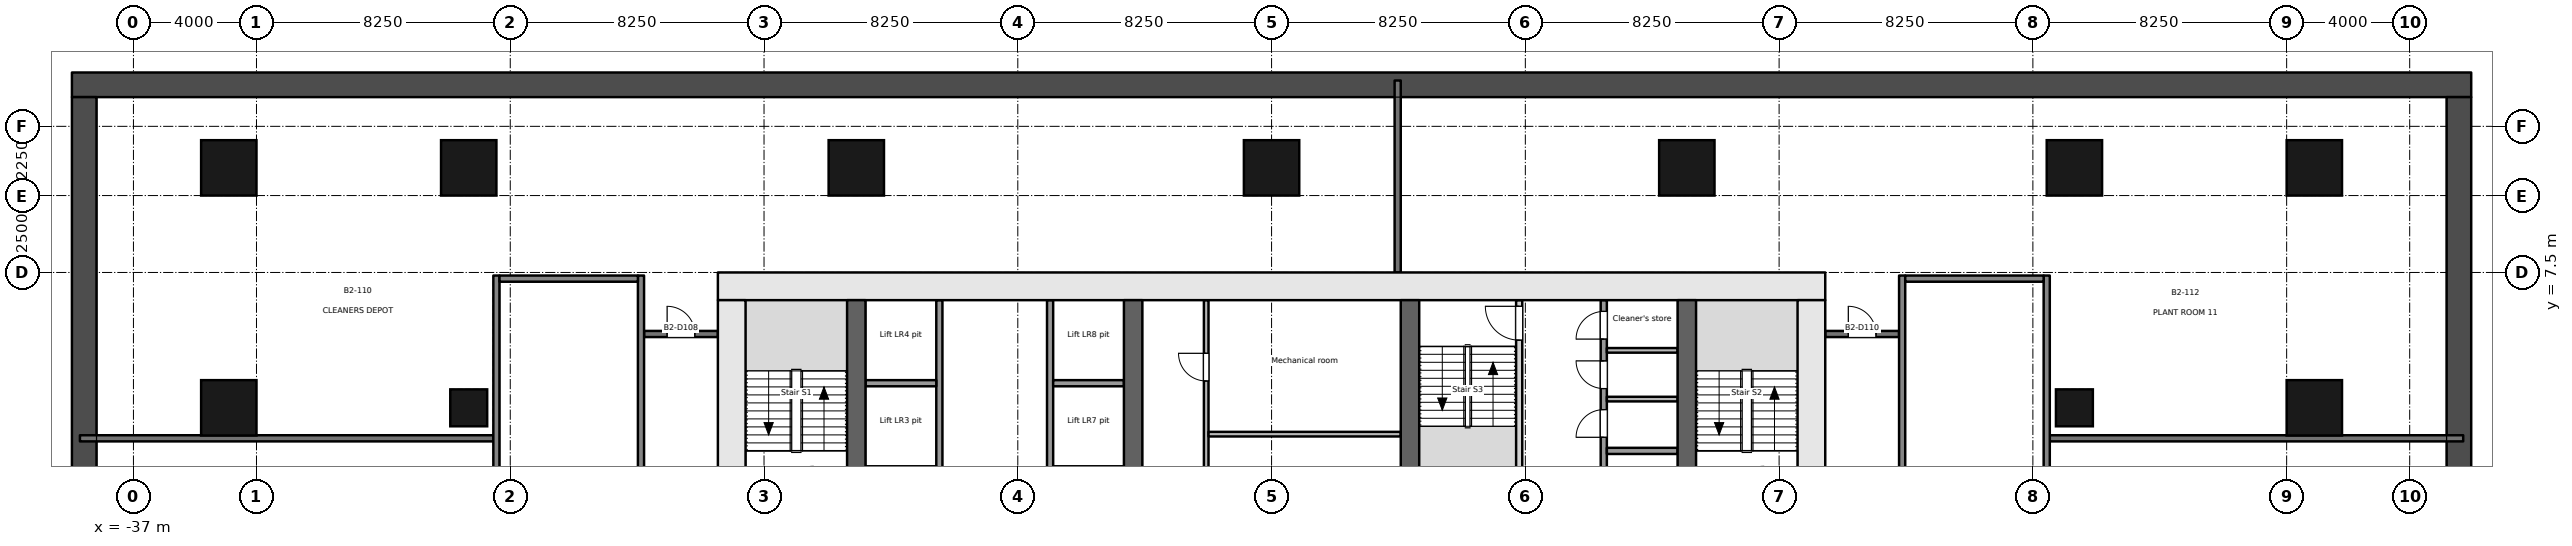
"""IFC4 building model, lengths in metres.
Left out: names, types, materials, properties, quantities, classifications, styles, units other than length and angle.
Written with IfcOpenShell. Run it as: python <this file> out.ifc"""

import sys

from ifc_helpers import new_model, si_unit, direction, frame, frame_2d, origin, origin_2d, place, context, subcontext, project, spatial, rectangle, extrude, element, fill, save


model = new_model("IFC4")
c1 = context("Model", 3, precision=1e-05, world=origin(), true_north=direction((0.0, 1.0)))
c2 = subcontext(c1, "Body", "Model", "MODEL_VIEW")
j1 = project(units=[si_unit("LENGTHUNIT", "METRE"), si_unit("PLANEANGLEUNIT", "RADIAN")], contexts=[c1])
p1 = place(None, origin())
s1 = spatial("IfcSite", under=j1, at=p1, CompositionType="ELEMENT")
p2 = place(p1, origin())
s2 = spatial("IfcBuilding", under=s1, at=p2, CompositionType="ELEMENT")
p3 = place(p2, frame((0.0, 0.0, -9.5)))
s3 = spatial("IfcBuildingStorey", under=s2, at=p3, CompositionType="ELEMENT", Elevation=-9.5)
p4 = place(p3, frame((-39.0, 13.6, -0.2), z_axis=(0.0, 0.0, 1.0), x_axis=(1.0, 0.0, 0.0)))
e1 = element("IfcWall", 1, at=p4, inside=s3, PredefinedType="SOLIDWALL", context=c2, shape_type="SweptSolid", body=[
    extrude(rectangle(XDim=78.0, YDim=0.8, at=frame_2d((39.0, 0.0))), origin(), (0.0, 0.0, 1.0), 4.0),
])
for number, where, z_axis, x_axis in (
    (2, (-38.6, -38.7, -0.2), (0.0, 0.0, 1.0), (0.0, 1.0, 0.0)),
    (3, (38.6, -38.7, -0.2), (0.0, 0.0, 1.0), (0.0, 1.0, 0.0)),
):
    element("IfcWall", number, at=place(p3, frame(where, z_axis=z_axis, x_axis=x_axis)), inside=s3, PredefinedType="SOLIDWALL", context=c2, shape_type="SweptSolid", body=[
        extrude(rectangle(XDim=51.9, YDim=0.8, at=frame_2d((25.95, 0.0))), origin(), (0.0, 0.0, 1.0), 4.0),
    ])
for number, where, z_axis, x_axis in (
    (4, (-33.9, 10.9, -0.2), (0.0, 0.0, 1.0), (1.0, 0.0, 0.0)),
    (5, (33.9, 10.9, -0.2), (0.0, 0.0, 1.0), (1.0, 0.0, 0.0)),
    (6, (-33.9, 3.1, -0.2), (0.0, 0.0, 1.0), (0.0, 1.0, 0.0)),
    (7, (33.9, 3.1, -0.2), (0.0, 0.0, 1.0), (0.0, 1.0, 0.0)),
    (8, (-26.1, 10.9, -0.2), (0.0, 0.0, 1.0), (1.0, 0.0, 0.0)),
    (9, (-13.5, 10.9, -0.2), (0.0, 0.0, 1.0), (1.0, 0.0, 0.0)),
    (10, (0.0, 10.9, -0.2), (0.0, 0.0, 1.0), (1.0, 0.0, 0.0)),
    (11, (13.5, 10.9, -0.2), (0.0, 0.0, 1.0), (1.0, 0.0, 0.0)),
    (12, (26.1, 10.9, -0.2), (0.0, 0.0, 1.0), (1.0, 0.0, 0.0)),
):
    element("IfcColumn", number, at=place(p3, frame(where, z_axis=z_axis, x_axis=x_axis)), inside=s3, PredefinedType="COLUMN", context=c2, shape_type="SweptSolid", body=[
        extrude(rectangle(XDim=1.8, YDim=1.8, at=origin_2d()), origin(), (0.0, 0.0, 1.0), 4.0),
    ])
for number, where, z_axis, x_axis in (
    (13, (-26.1, 3.1, -0.2), (0.0, 0.0, 1.0), (1.0, 0.0, 0.0)),
    (14, (26.1, 3.1, -0.2), (0.0, 0.0, 1.0), (1.0, 0.0, 0.0)),
):
    element("IfcColumn", number, at=place(p3, frame(where, z_axis=z_axis, x_axis=x_axis)), inside=s3, PredefinedType="COLUMN", context=c2, shape_type="SweptSolid", body=[
        extrude(rectangle(XDim=1.2, YDim=1.2, at=origin_2d()), origin(), (0.0, 0.0, 1.0), 4.0),
    ])
p5 = place(p3, frame((-18.0, 7.05, -0.2), z_axis=(0.0, 0.0, 1.0), x_axis=(1.0, 0.0, 0.0)))
e15 = element("IfcWall", 15, at=p5, inside=s3, PredefinedType="SHEAR", context=c2, shape_type="SweptSolid", body=[
    extrude(rectangle(XDim=36.0, YDim=0.9, at=frame_2d((18.0, 0.0))), origin(), (0.0, 0.0, 1.0), 4.0),
])
p6 = place(p3, frame((-17.55, -6.6, -0.2), z_axis=(0.0, 0.0, 1.0), x_axis=(0.0, 1.0, 0.0)))
e16 = element("IfcWall", 16, at=p6, inside=s3, PredefinedType="SHEAR", context=c2, shape_type="SweptSolid", body=[
    extrude(rectangle(XDim=13.2, YDim=0.9, at=frame_2d((6.6, 0.0))), origin(), (0.0, 0.0, 1.0), 4.0),
])
p7 = place(p6, frame((4.55, 0.0, 0.2)))
e17 = element("IfcOpeningElement", 17, at=p7, cuts=e16, PredefinedType="OPENING", context=c2, shape_type="SweptSolid", body=[
    extrude(rectangle(XDim=1.2, YDim=2.1, at=frame_2d((0.6, 1.05))), frame((0.0, 0.46, 0.0), z_axis=(0.0, -1.0, 0.0), x_axis=(1.0, 0.0, 0.0)), (0.0, 0.0, 1.0), 0.921),
])
p8 = place(p3, frame((17.55, -6.6, -0.2), z_axis=(0.0, 0.0, 1.0), x_axis=(0.0, 1.0, 0.0)))
e18 = element("IfcWall", 18, at=p8, inside=s3, PredefinedType="SHEAR", context=c2, shape_type="SweptSolid", body=[
    extrude(rectangle(XDim=13.2, YDim=0.9, at=frame_2d((6.6, 0.0))), origin(), (0.0, 0.0, 1.0), 4.0),
])
p9 = place(p8, frame((4.55, 0.0, 0.2)))
e19 = element("IfcOpeningElement", 19, at=p9, cuts=e18, PredefinedType="OPENING", context=c2, shape_type="SweptSolid", body=[
    extrude(rectangle(XDim=1.2, YDim=2.1, at=frame_2d((0.6, 1.05))), frame((0.0, 0.46, 0.0), z_axis=(0.0, -1.0, 0.0), x_axis=(1.0, 0.0, 0.0)), (0.0, 0.0, 1.0), 0.921),
])
for number, where, z_axis, x_axis in (
    (20, (-13.5, -6.6, -0.2), (0.0, 0.0, 1.0), (0.0, 1.0, 0.0)),
    (21, (-4.5, -6.6, -0.2), (0.0, 0.0, 1.0), (0.0, 1.0, 0.0)),
    (22, (4.5, -6.6, -0.2), (0.0, 0.0, 1.0), (0.0, 1.0, 0.0)),
    (23, (13.5, -6.6, -0.2), (0.0, 0.0, 1.0), (0.0, 1.0, 0.0)),
):
    element("IfcWall", number, at=place(p3, frame(where, z_axis=z_axis, x_axis=x_axis)), inside=s3, PredefinedType="SHEAR", context=c2, shape_type="SweptSolid", body=[
        extrude(rectangle(XDim=13.2, YDim=0.6, at=frame_2d((6.6, 0.0))), origin(), (0.0, 0.0, 1.0), 4.0),
    ])
p10 = place(p3, frame((-10.8, -6.6, 0.0), z_axis=(0.0, 0.0, 1.0), x_axis=(0.0, 1.0, 0.0)))
e24 = element("IfcWall", 24, at=p10, inside=s3, PredefinedType="PARTITIONING", context=c2, shape_type="SweptSolid", body=[
    extrude(rectangle(XDim=13.2, YDim=0.2, at=frame_2d((6.6, 0.0))), origin(), (0.0, 0.0, 1.0), 3.8),
])
p11 = place(p10, frame((0.55, 0.0, 0.0)))
e25 = element("IfcOpeningElement", 25, at=p11, cuts=e24, PredefinedType="OPENING", context=c2, shape_type="SweptSolid", body=[
    extrude(rectangle(XDim=0.9, YDim=2.1, at=frame_2d((0.45, 1.05))), frame((0.0, 0.111, 0.0), z_axis=(0.0, -1.0, 0.0), x_axis=(1.0, 0.0, 0.0)), (0.0, 0.0, 1.0), 0.221),
])
p12 = place(p3, frame((-7.2, -6.6, 0.0), z_axis=(0.0, 0.0, 1.0), x_axis=(0.0, 1.0, 0.0)))
e26 = element("IfcWall", 26, at=p12, inside=s3, PredefinedType="PARTITIONING", context=c2, shape_type="SweptSolid", body=[
    extrude(rectangle(XDim=13.2, YDim=0.2, at=frame_2d((6.6, 0.0))), origin(), (0.0, 0.0, 1.0), 3.8),
])
p13 = place(p12, frame((0.55, 0.0, 0.0)))
e27 = element("IfcOpeningElement", 27, at=p13, cuts=e26, PredefinedType="OPENING", context=c2, shape_type="SweptSolid", body=[
    extrude(rectangle(XDim=0.9, YDim=2.1, at=frame_2d((0.45, 1.05))), frame((0.0, 0.111, 0.0), z_axis=(0.0, -1.0, 0.0), x_axis=(1.0, 0.0, 0.0)), (0.0, 0.0, 1.0), 0.221),
])
for number, where, z_axis, x_axis in (
    (28, (-13.2, 3.9, 0.0), (0.0, 0.0, 1.0), (1.0, 0.0, 0.0)),
    (29, (-7.1, 3.9, 0.0), (0.0, 0.0, 1.0), (1.0, 0.0, 0.0)),
):
    element("IfcWall", number, at=place(p3, frame(where, z_axis=z_axis, x_axis=x_axis)), inside=s3, PredefinedType="PARTITIONING", context=c2, shape_type="SweptSolid", body=[
        extrude(rectangle(XDim=2.3, YDim=0.2, at=frame_2d((1.15, 0.0))), origin(), (0.0, 0.0, 1.0), 3.8),
    ])
p14 = place(p3, frame((-2.125, -6.6, 0.0), z_axis=(0.0, 0.0, 1.0), x_axis=(0.0, 1.0, 0.0)))
e30 = element("IfcWall", 30, at=p14, inside=s3, PredefinedType="PARTITIONING", context=c2, shape_type="SweptSolid", body=[
    extrude(rectangle(XDim=13.2, YDim=0.15, at=frame_2d((6.6, 0.0))), origin(), (0.0, 0.0, 1.0), 3.8),
])
p15 = place(p14, frame((1.794, 0.0, 0.0)))
e31 = element("IfcOpeningElement", 31, at=p15, cuts=e30, PredefinedType="OPENING", context=c2, shape_type="SweptSolid", body=[
    extrude(rectangle(XDim=0.9, YDim=2.1, at=frame_2d((0.45, 1.05))), frame((0.0, 0.085, 0.0), z_axis=(0.0, -1.0, 0.0), x_axis=(1.0, 0.0, 0.0)), (0.0, 0.0, 1.0), 0.171),
])
p16 = place(p14, frame((6.216, 0.0, 0.0)))
e32 = element("IfcOpeningElement", 32, at=p16, cuts=e30, PredefinedType="OPENING", context=c2, shape_type="SweptSolid", body=[
    extrude(rectangle(XDim=0.9, YDim=2.1, at=frame_2d((0.45, 1.05))), frame((0.0, 0.085, 0.0), z_axis=(0.0, -1.0, 0.0), x_axis=(1.0, 0.0, 0.0)), (0.0, 0.0, 1.0), 0.171),
])
p17 = place(p14, frame((10.572, 0.0, 0.0)))
e33 = element("IfcOpeningElement", 33, at=p17, cuts=e30, PredefinedType="OPENING", context=c2, shape_type="SweptSolid", body=[
    extrude(rectangle(XDim=0.9, YDim=2.1, at=frame_2d((0.45, 1.05))), frame((0.0, 0.085, 0.0), z_axis=(0.0, -1.0, 0.0), x_axis=(1.0, 0.0, 0.0)), (0.0, 0.0, 1.0), 0.171),
])
p18 = place(p3, frame((-2.05, 2.244, 0.0), z_axis=(0.0, 0.0, 1.0), x_axis=(1.0, 0.0, 0.0)))
e34 = element("IfcWall", 34, at=p18, inside=s3, PredefinedType="PARTITIONING", context=c2, shape_type="SweptSolid", body=[
    extrude(rectangle(XDim=6.25, YDim=0.15, at=frame_2d((3.125, 0.0))), origin(), (0.0, 0.0, 1.0), 3.8),
])
p19 = place(p3, frame((8.05, -6.6, 0.0), z_axis=(0.0, 0.0, 1.0), x_axis=(0.0, 1.0, 0.0)))
e35 = element("IfcWall", 35, at=p19, inside=s3, PredefinedType="PARTITIONING", context=c2, shape_type="SweptSolid", body=[
    extrude(rectangle(XDim=13.2, YDim=0.2, at=frame_2d((6.6, 0.0))), origin(), (0.0, 0.0, 1.0), 3.8),
])
p20 = place(p19, frame((1.386, 0.0, 0.0)))
e36 = element("IfcOpeningElement", 36, at=p20, cuts=e35, PredefinedType="OPENING", context=c2, shape_type="SweptSolid", body=[
    extrude(rectangle(XDim=0.9, YDim=2.1, at=frame_2d((0.45, 1.05))), frame((0.0, 0.111, 0.0), z_axis=(0.0, -1.0, 0.0), x_axis=(1.0, 0.0, 0.0)), (0.0, 0.0, 1.0), 0.221),
])
p21 = place(p19, frame((4.786, 0.0, 0.0)))
e37 = element("IfcOpeningElement", 37, at=p21, cuts=e35, PredefinedType="OPENING", context=c2, shape_type="SweptSolid", body=[
    extrude(rectangle(XDim=0.9, YDim=2.1, at=frame_2d((0.45, 1.05))), frame((0.0, 0.111, 0.0), z_axis=(0.0, -1.0, 0.0), x_axis=(1.0, 0.0, 0.0)), (0.0, 0.0, 1.0), 0.221),
])
p22 = place(p19, frame((11.9, 0.0, 0.0)))
e38 = element("IfcOpeningElement", 38, at=p22, cuts=e35, PredefinedType="OPENING", context=c2, shape_type="SweptSolid", body=[
    extrude(rectangle(XDim=1.1, YDim=2.1, at=frame_2d((0.55, 1.05))), frame((0.0, 0.111, 0.0), z_axis=(0.0, -1.0, 0.0), x_axis=(1.0, 0.0, 0.0)), (0.0, 0.0, 1.0), 0.221),
])
p23 = place(p3, frame((10.8, -6.6, 0.0), z_axis=(0.0, 0.0, 1.0), x_axis=(0.0, 1.0, 0.0)))
e39 = element("IfcWall", 39, at=p23, inside=s3, PredefinedType="PARTITIONING", context=c2, shape_type="SweptSolid", body=[
    extrude(rectangle(XDim=13.2, YDim=0.2, at=frame_2d((6.6, 0.0))), origin(), (0.0, 0.0, 1.0), 3.8),
])
p24 = place(p23, frame((0.7, 0.0, 0.0)))
e40 = element("IfcOpeningElement", 40, at=p24, cuts=e39, PredefinedType="OPENING", context=c2, shape_type="SweptSolid", body=[
    extrude(rectangle(XDim=1.2, YDim=2.1, at=frame_2d((0.6, 1.05))), frame((0.0, 0.111, 0.0), z_axis=(0.0, -1.0, 0.0), x_axis=(1.0, 0.0, 0.0)), (0.0, 0.0, 1.0), 0.221),
])
p25 = place(p23, frame((3.6, 0.0, 0.0)))
e41 = element("IfcOpeningElement", 41, at=p25, cuts=e39, PredefinedType="OPENING", context=c2, shape_type="SweptSolid", body=[
    extrude(rectangle(XDim=1.0, YDim=2.1, at=frame_2d((0.5, 1.05))), frame((0.0, 0.111, 0.0), z_axis=(0.0, -1.0, 0.0), x_axis=(1.0, 0.0, 0.0)), (0.0, 0.0, 1.0), 0.221),
])
p26 = place(p23, frame((6.4, 0.0, 0.0)))
e42 = element("IfcOpeningElement", 42, at=p26, cuts=e39, PredefinedType="OPENING", context=c2, shape_type="SweptSolid", body=[
    extrude(rectangle(XDim=1.0, YDim=2.1, at=frame_2d((0.5, 1.05))), frame((0.0, 0.111, 0.0), z_axis=(0.0, -1.0, 0.0), x_axis=(1.0, 0.0, 0.0)), (0.0, 0.0, 1.0), 0.221),
])
p27 = place(p23, frame((8.742, 0.0, 0.0)))
e43 = element("IfcOpeningElement", 43, at=p27, cuts=e39, PredefinedType="OPENING", context=c2, shape_type="SweptSolid", body=[
    extrude(rectangle(XDim=0.9, YDim=2.1, at=frame_2d((0.45, 1.05))), frame((0.0, 0.111, 0.0), z_axis=(0.0, -1.0, 0.0), x_axis=(1.0, 0.0, 0.0)), (0.0, 0.0, 1.0), 0.221),
])
p28 = place(p23, frame((10.326, 0.0, 0.0)))
e44 = element("IfcOpeningElement", 44, at=p28, cuts=e39, PredefinedType="OPENING", context=c2, shape_type="SweptSolid", body=[
    extrude(rectangle(XDim=0.9, YDim=2.1, at=frame_2d((0.45, 1.05))), frame((0.0, 0.111, 0.0), z_axis=(0.0, -1.0, 0.0), x_axis=(1.0, 0.0, 0.0)), (0.0, 0.0, 1.0), 0.221),
])
p29 = place(p23, frame((11.934, 0.0, 0.0)))
e45 = element("IfcOpeningElement", 45, at=p29, cuts=e39, PredefinedType="OPENING", context=c2, shape_type="SweptSolid", body=[
    extrude(rectangle(XDim=0.9, YDim=2.1, at=frame_2d((0.45, 1.05))), frame((0.0, 0.111, 0.0), z_axis=(0.0, -1.0, 0.0), x_axis=(1.0, 0.0, 0.0)), (0.0, 0.0, 1.0), 0.221),
])
p30 = place(p3, frame((10.9, 1.7, 0.0), z_axis=(0.0, 0.0, 1.0), x_axis=(1.0, 0.0, 0.0)))
e46 = element("IfcWall", 46, at=p30, inside=s3, PredefinedType="PARTITIONING", context=c2, shape_type="SweptSolid", body=[
    extrude(rectangle(XDim=2.3, YDim=0.2, at=frame_2d((1.15, 0.0))), origin(), (0.0, 0.0, 1.0), 3.8),
])
for number, where, z_axis, x_axis in (
    (47, (10.9, 3.384, 0.0), (0.0, 0.0, 1.0), (1.0, 0.0, 0.0)),
    (48, (10.9, 4.968, 0.0), (0.0, 0.0, 1.0), (1.0, 0.0, 0.0)),
):
    element("IfcWall", number, at=place(p3, frame(where, z_axis=z_axis, x_axis=x_axis)), inside=s3, PredefinedType="PARTITIONING", context=c2, shape_type="SweptSolid", body=[
        extrude(rectangle(XDim=2.3, YDim=0.15, at=frame_2d((1.15, 0.0))), origin(), (0.0, 0.0, 1.0), 3.8),
    ])
for number, where, z_axis, x_axis in (
    (49, (-20.5, 7.4, -0.2), (0.0, 0.0, 1.0), (0.0, -1.0, 0.0)),
    (50, (-25.2, 0.0, -0.2), (0.0, 0.0, 1.0), (0.0, 1.0, 0.0)),
):
    element("IfcWall", number, at=place(p3, frame(where, z_axis=z_axis, x_axis=x_axis)), inside=s3, PredefinedType="SHEAR", context=c2, shape_type="SweptSolid", body=[
        extrude(rectangle(XDim=7.4, YDim=0.2, at=frame_2d((3.7, 0.0))), origin(), (0.0, 0.0, 1.0), 4.0),
    ])
p31 = place(p3, frame((-25.1, 7.3, -0.2), z_axis=(0.0, 0.0, 1.0), x_axis=(1.0, 0.0, 0.0)))
e51 = element("IfcWall", 51, at=p31, inside=s3, PredefinedType="SHEAR", context=c2, shape_type="SweptSolid", body=[
    extrude(rectangle(XDim=4.5, YDim=0.2, at=frame_2d((2.25, 0.0))), origin(), (0.0, 0.0, 1.0), 4.0),
])
for number, where, z_axis, x_axis in (
    (52, (20.5, 0.0, -0.2), (0.0, 0.0, 1.0), (0.0, 1.0, 0.0)),
    (53, (25.2, 0.0, -0.2), (0.0, 0.0, 1.0), (0.0, 1.0, 0.0)),
):
    element("IfcWall", number, at=place(p3, frame(where, z_axis=z_axis, x_axis=x_axis)), inside=s3, PredefinedType="SHEAR", context=c2, shape_type="SweptSolid", body=[
        extrude(rectangle(XDim=7.4, YDim=0.2, at=frame_2d((3.7, 0.0))), origin(), (0.0, 0.0, 1.0), 4.0),
    ])
p32 = place(p3, frame((20.6, 7.3, -0.2), z_axis=(0.0, 0.0, 1.0), x_axis=(1.0, 0.0, 0.0)))
e54 = element("IfcWall", 54, at=p32, inside=s3, PredefinedType="SHEAR", context=c2, shape_type="SweptSolid", body=[
    extrude(rectangle(XDim=4.5, YDim=0.2, at=frame_2d((2.25, 0.0))), origin(), (0.0, 0.0, 1.0), 4.0),
])
p33 = place(p3, frame((-20.4, 5.5, 0.0), z_axis=(0.0, 0.0, 1.0), x_axis=(1.0, 0.0, 0.0)))
e55 = element("IfcWall", 55, at=p33, inside=s3, PredefinedType="PARTITIONING", context=c2, shape_type="SweptSolid", body=[
    extrude(rectangle(XDim=2.4, YDim=0.2, at=frame_2d((1.2, 0.0))), origin(), (0.0, 0.0, 1.0), 3.8),
])
p34 = place(p33, frame((0.75, 0.0, 0.0)))
e56 = element("IfcOpeningElement", 56, at=p34, cuts=e55, PredefinedType="OPENING", context=c2, shape_type="SweptSolid", body=[
    extrude(rectangle(XDim=0.9, YDim=2.1, at=frame_2d((0.45, 1.05))), frame((0.0, 0.111, 0.0), z_axis=(0.0, -1.0, 0.0), x_axis=(1.0, 0.0, 0.0)), (0.0, 0.0, 1.0), 0.221),
])
p35 = place(p3, frame((18.0, 5.5, 0.0), z_axis=(0.0, 0.0, 1.0), x_axis=(1.0, 0.0, 0.0)))
e57 = element("IfcWall", 57, at=p35, inside=s3, PredefinedType="PARTITIONING", context=c2, shape_type="SweptSolid", body=[
    extrude(rectangle(XDim=2.4, YDim=0.2, at=frame_2d((1.2, 0.0))), origin(), (0.0, 0.0, 1.0), 3.8),
])
p36 = place(p35, frame((0.75, 0.0, 0.0)))
e58 = element("IfcOpeningElement", 58, at=p36, cuts=e57, PredefinedType="OPENING", context=c2, shape_type="SweptSolid", body=[
    extrude(rectangle(XDim=0.9, YDim=2.1, at=frame_2d((0.45, 1.05))), frame((0.0, 0.111, 0.0), z_axis=(0.0, -1.0, 0.0), x_axis=(1.0, 0.0, 0.0)), (0.0, 0.0, 1.0), 0.221),
])
p37 = place(p3, frame((-38.74, 2.109, 0.0), z_axis=(0.0, 0.0, 1.0), x_axis=(1.0, 0.0, 0.0)))
e59 = element("IfcWall", 59, at=p37, inside=s3, PredefinedType="PARTITIONING", context=c2, shape_type="SweptSolid", body=[
    extrude(rectangle(XDim=13.44, YDim=0.2, at=frame_2d((6.72, 0.0))), origin(), (0.0, 0.0, 1.0), 2.6),
])
p38 = place(p3, frame((4.1, 13.74, 0.0), z_axis=(0.0, 0.0, 1.0), x_axis=(0.0, -1.0, 0.0)))
e60 = element("IfcWall", 60, at=p38, inside=s3, PredefinedType="PARTITIONING", context=c2, shape_type="SweptSolid", body=[
    extrude(rectangle(XDim=6.24, YDim=0.2, at=frame_2d((3.12, 0.0))), origin(), (0.0, 0.0, 1.0), 2.8),
])
p39 = place(p3, frame((25.3, 2.109, 0.0), z_axis=(0.0, 0.0, 1.0), x_axis=(1.0, 0.0, 0.0)))
e61 = element("IfcWall", 61, at=p39, inside=s3, PredefinedType="PARTITIONING", context=c2, shape_type="SweptSolid", body=[
    extrude(rectangle(XDim=13.44, YDim=0.2, at=frame_2d((6.72, 0.0))), origin(), (0.0, 0.0, 1.0), 2.6),
])
p40 = place(p17, origin())
e62 = element("IfcDoor", 62, at=p40, inside=s3, OperationType="SINGLE_SWING_RIGHT", PredefinedType="DOOR", context=c2, shape_type="SweptSolid", body=[
    extrude(rectangle(XDim=0.9, YDim=2.1, at=frame_2d((0.45, 1.05))), frame((0.0, 0.025, 0.0), z_axis=(0.0, -1.0, 0.0), x_axis=(1.0, 0.0, 0.0)), (0.0, 0.0, 1.0), 0.05),
])
fill(e33, e62)
p41 = place(p22, origin())
e63 = element("IfcDoor", 63, at=p41, inside=s3, OperationType="SINGLE_SWING_RIGHT", PredefinedType="DOOR", context=c2, shape_type="SweptSolid", body=[
    extrude(rectangle(XDim=1.1, YDim=2.1, at=frame_2d((0.55, 1.05))), frame((0.0, 0.025, 0.0), z_axis=(0.0, -1.0, 0.0), x_axis=(1.0, 0.0, 0.0)), (0.0, 0.0, 1.0), 0.05),
])
fill(e38, e63)
p42 = place(p27, origin())
e64 = element("IfcDoor", 64, at=p42, inside=s3, OperationType="SINGLE_SWING_LEFT", PredefinedType="DOOR", context=c2, shape_type="SweptSolid", body=[
    extrude(rectangle(XDim=0.9, YDim=2.1, at=frame_2d((0.45, 1.05))), frame((0.0, 0.025, 0.0), z_axis=(0.0, -1.0, 0.0), x_axis=(1.0, 0.0, 0.0)), (0.0, 0.0, 1.0), 0.05),
])
fill(e43, e64)
p43 = place(p28, origin())
e65 = element("IfcDoor", 65, at=p43, inside=s3, OperationType="SINGLE_SWING_RIGHT", PredefinedType="DOOR", context=c2, shape_type="SweptSolid", body=[
    extrude(rectangle(XDim=0.9, YDim=2.1, at=frame_2d((0.45, 1.05))), frame((0.0, 0.025, 0.0), z_axis=(0.0, -1.0, 0.0), x_axis=(1.0, 0.0, 0.0)), (0.0, 0.0, 1.0), 0.05),
])
fill(e44, e65)
p44 = place(p29, origin())
e66 = element("IfcDoor", 66, at=p44, inside=s3, OperationType="SINGLE_SWING_LEFT", PredefinedType="DOOR", context=c2, shape_type="SweptSolid", body=[
    extrude(rectangle(XDim=0.9, YDim=2.1, at=frame_2d((0.45, 1.05))), frame((0.0, 0.025, 0.0), z_axis=(0.0, -1.0, 0.0), x_axis=(1.0, 0.0, 0.0)), (0.0, 0.0, 1.0), 0.05),
])
fill(e45, e66)
p45 = place(p34, origin())
e67 = element("IfcDoor", 67, at=p45, inside=s3, OperationType="SINGLE_SWING_LEFT", PredefinedType="DOOR", context=c2, shape_type="SweptSolid", body=[
    extrude(rectangle(XDim=0.9, YDim=2.1, at=frame_2d((0.45, 1.05))), frame((0.0, 0.025, 0.0), z_axis=(0.0, -1.0, 0.0), x_axis=(1.0, 0.0, 0.0)), (0.0, 0.0, 1.0), 0.05),
])
fill(e56, e67)
p46 = place(p36, origin())
e68 = element("IfcDoor", 68, at=p46, inside=s3, OperationType="SINGLE_SWING_LEFT", PredefinedType="DOOR", context=c2, shape_type="SweptSolid", body=[
    extrude(rectangle(XDim=0.9, YDim=2.1, at=frame_2d((0.45, 1.05))), frame((0.0, 0.025, 0.0), z_axis=(0.0, -1.0, 0.0), x_axis=(1.0, 0.0, 0.0)), (0.0, 0.0, 1.0), 0.05),
])
fill(e58, e68)
save(model, sys.argv[1])
